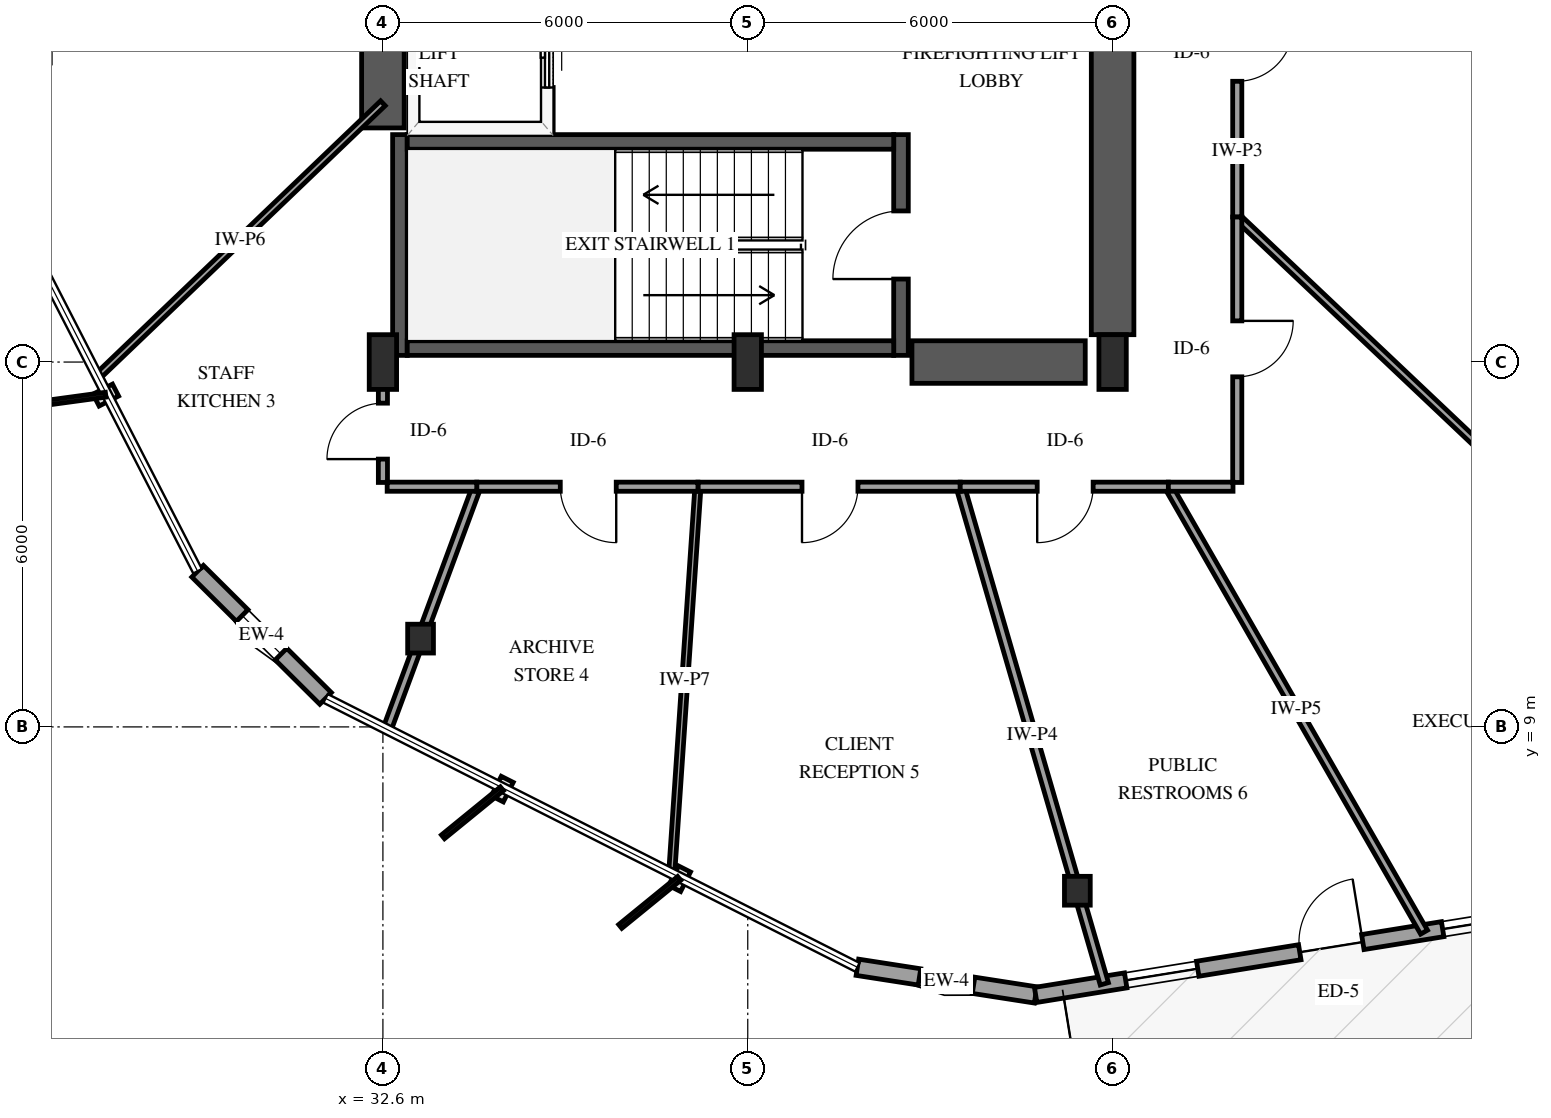
"""IFC4 building model, lengths in metres.
Left out: names, types, materials, properties, quantities, classifications, styles, units other than length and angle.
Written with IfcOpenShell. Run it as: python <this file> out.ifc"""

import sys

from ifc_helpers import new_model, si_unit, direction, frame, frame_2d, origin, origin_2d, place, context, subcontext, project, spatial, rectangle, i_section, extrude, element, fill, save


model = new_model("IFC4")
c1 = context("Model", 3, precision=1e-05, world=origin(), true_north=direction((0.0, 1.0)))
c2 = subcontext(c1, "Body", "Model", "MODEL_VIEW")
j1 = project(units=[si_unit("LENGTHUNIT", "METRE"), si_unit("PLANEANGLEUNIT", "RADIAN")], contexts=[c1])
p1 = place(None, origin())
s1 = spatial("IfcSite", under=j1, at=p1, CompositionType="ELEMENT")
p2 = place(p1, origin())
s2 = spatial("IfcBuilding", under=s1, at=p2, CompositionType="ELEMENT")
p3 = place(p2, frame((0.0, 0.0, 62.6)))
s3 = spatial("IfcBuildingStorey", under=s2, at=p3, CompositionType="ELEMENT", Elevation=62.6)
p4 = place(p3, frame((32.88, 15.11, 0.0), z_axis=(0.0, 0.0, 1.0), x_axis=(0.0, 1.0, 0.0)))
e1 = element("IfcWall", 1, at=p4, inside=s3, PredefinedType="SHEAR", context=c2, shape_type="SweptSolid", body=[
    extrude(rectangle(XDim=3.63, YDim=0.24, at=frame_2d((1.815, 0.0))), origin(), (0.0, 0.0, 1.0), 4.0),
])
p5 = place(p3, frame((41.12, 15.11, 0.0), z_axis=(0.0, 0.0, 1.0), x_axis=(0.0, 1.0, 0.0)))
e2 = element("IfcWall", 2, at=p5, inside=s3, PredefinedType="SHEAR", context=c2, shape_type="SweptSolid", body=[
    extrude(rectangle(XDim=3.63, YDim=0.24, at=frame_2d((1.815, 0.0))), origin(), (0.0, 0.0, 1.0), 4.0),
])
p6 = place(p5, frame((1.255, 0.0, 0.0)))
e3 = element("IfcOpeningElement", 3, at=p6, cuts=e2, PredefinedType="OPENING", context=c2, shape_type="SweptSolid", body=[
    extrude(rectangle(XDim=1.12, YDim=2.15, at=frame_2d((0.56, 1.075))), frame((0.0, 0.13, 0.0), z_axis=(0.0, -1.0, 0.0), x_axis=(1.0, 0.0, 0.0)), (0.0, 0.0, 1.0), 0.26),
])
for number, where, z_axis, x_axis in (
    (4, (33.0, 15.23, 0.0), (0.0, 0.0, 1.0), (1.0, 0.0, 0.0)),
    (5, (33.0, 18.62, 0.0), (0.0, 0.0, 1.0), (1.0, 0.0, 0.0)),
):
    element("IfcWall", number, at=place(p3, frame(where, z_axis=z_axis, x_axis=x_axis)), inside=s3, PredefinedType="SHEAR", context=c2, shape_type="SweptSolid", body=[
        extrude(rectangle(XDim=8.0, YDim=0.24, at=frame_2d((4.0, 0.0))), origin(), (0.0, 0.0, 1.0), 4.0),
    ])
p7 = place(p3, frame((32.6, 18.85, 0.0), z_axis=(0.0, 0.0, 1.0), x_axis=(0.0, 1.0, 0.0)))
e6 = element("IfcWall", 6, at=p7, inside=s3, PredefinedType="SHEAR", context=c2, shape_type="SweptSolid", body=[
    extrude(rectangle(XDim=12.3, YDim=0.7, at=frame_2d((6.15, 0.0))), origin(), (0.0, 0.0, 1.0), 4.0),
])
p8 = place(p3, frame((41.3, 15.0, 0.0), z_axis=(0.0, 0.0, 1.0), x_axis=(1.0, 0.0, 0.0)))
e7 = element("IfcWall", 7, at=p8, inside=s3, PredefinedType="SHEAR", context=c2, shape_type="SweptSolid", body=[
    extrude(rectangle(XDim=2.85, YDim=0.7, at=frame_2d((1.425, 0.0))), origin(), (0.0, 0.0, 1.0), 4.0),
])
p9 = place(p3, frame((44.6, 15.45, 0.0), z_axis=(0.0, 0.0, 1.0), x_axis=(0.0, 1.0, 0.0)))
e8 = element("IfcWall", 8, at=p9, inside=s3, PredefinedType="SHEAR", context=c2, shape_type="SweptSolid", body=[
    extrude(rectangle(XDim=6.35, YDim=0.7, at=frame_2d((3.175, 0.0))), origin(), (0.0, 0.0, 1.0), 4.0),
])
for number, where, z_axis, x_axis in (
    (9, (32.6, 15.0, 0.0), (0.0, 0.0, 1.0), (1.0, 0.0, 0.0)),
    (10, (38.6, 15.0, 0.0), (0.0, 0.0, 1.0), (1.0, 0.0, 0.0)),
    (11, (44.6, 15.0, 0.0), (0.0, 0.0, 1.0), (1.0, 0.0, 0.0)),
):
    element("IfcColumn", number, at=place(p3, frame(where, z_axis=z_axis, x_axis=x_axis)), inside=s3, PredefinedType="PILASTER", context=c2, shape_type="SweptSolid", body=[
        extrude(rectangle(XDim=0.45, YDim=0.9, at=origin_2d()), origin(), (0.0, 0.0, 1.0), 4.0),
    ])
for number, where, z_axis, x_axis in (
    (12, (33.219, 10.452, 0.0), (0.0, 0.0, 1.0), (1.0, 0.0, 0.0)),
    (13, (44.02, 6.306, 0.0), (0.0, 0.0, 1.0), (1.0, 0.0, 0.0)),
):
    element("IfcColumn", number, at=place(p3, frame(where, z_axis=z_axis, x_axis=x_axis)), inside=s3, PredefinedType="COLUMN", context=c2, shape_type="SweptSolid", body=[
        extrude(i_section(OverallWidth=0.424, OverallDepth=0.474, WebThickness=0.048, FlangeThickness=0.077, FilletRadius=0.038, at=origin_2d()), origin(), (0.0, 0.0, 1.0), 4.0),
    ])
p10 = place(p3, frame((29.553, 11.56, 0.0), z_axis=(0.0, 0.0, 1.0), x_axis=(0.709325332319, -0.704881247396, 0.0)))
e14 = element("IfcWall", 14, at=p10, inside=s3, PredefinedType="SOLIDWALL", context=c2, shape_type="SweptSolid", body=[
    extrude(rectangle(XDim=2.967, YDim=0.27, at=frame_2d((1.483, 0.0))), origin(), (0.0, 0.0, 1.0), 3.079),
])
p11 = place(p10, frame((1.033, 0.0, 0.75)))
e15 = element("IfcOpeningElement", 15, at=p11, cuts=e14, PredefinedType="OPENING", context=c2, shape_type="SweptSolid", body=[
    extrude(rectangle(XDim=0.9, YDim=1.5, at=frame_2d((0.45, 0.75))), frame((0.0, 0.145, 0.0), z_axis=(0.0, -1.0, 0.0), x_axis=(1.0, 0.0, 0.0)), (0.0, 0.0, 1.0), 0.29),
])
p12 = place(p3, frame((40.403, 5.047, 0.0), z_axis=(0.0, 0.0, 1.0), x_axis=(0.988175838345, -0.153324859402, 0.0)))
e16 = element("IfcWall", 16, at=p12, inside=s3, PredefinedType="SOLIDWALL", context=c2, shape_type="SweptSolid", body=[
    extrude(rectangle(XDim=2.967, YDim=0.27, at=frame_2d((1.483, 0.0))), origin(), (0.0, 0.0, 1.0), 3.079),
])
p13 = place(p12, frame((1.033, 0.0, 0.75)))
e17 = element("IfcOpeningElement", 17, at=p13, cuts=e16, PredefinedType="OPENING", context=c2, shape_type="SweptSolid", body=[
    extrude(rectangle(XDim=0.9, YDim=1.5, at=frame_2d((0.45, 0.75))), frame((0.0, 0.145, 0.0), z_axis=(0.0, -1.0, 0.0), x_axis=(1.0, 0.0, 0.0)), (0.0, 0.0, 1.0), 0.29),
])
p14 = place(p3, frame((43.334, 4.592, 0.0), z_axis=(0.0, 0.0, 1.0), x_axis=(0.987191297579, 0.159541035424, 0.0)))
e18 = element("IfcWall", 18, at=p14, inside=s3, PredefinedType="SOLIDWALL", context=c2, shape_type="SweptSolid", body=[
    extrude(rectangle(XDim=9.8, YDim=0.25, at=frame_2d((4.9, 0.0))), origin(), (0.0, 0.0, 1.0), 3.079),
])
p15 = place(p14, frame((4.4, 0.0, 0.0)))
e19 = element("IfcOpeningElement", 19, at=p15, cuts=e18, PredefinedType="OPENING", context=c2, shape_type="SweptSolid", body=[
    extrude(rectangle(XDim=1.05, YDim=2.15, at=frame_2d((0.525, 1.075))), frame((0.0, 0.135, 0.0), z_axis=(0.0, -1.0, 0.0), x_axis=(1.0, 0.0, 0.0)), (0.0, 0.0, 1.0), 0.27),
])
p16 = place(p14, frame((1.5, 0.0, 0.72)))
e20 = element("IfcOpeningElement", 20, at=p16, cuts=e18, PredefinedType="OPENING", context=c2, shape_type="SweptSolid", body=[
    extrude(rectangle(XDim=1.2, YDim=1.6, at=frame_2d((0.6, 0.8))), frame((0.0, 0.135, 0.0), z_axis=(0.0, -1.0, 0.0), x_axis=(1.0, 0.0, 0.0)), (0.0, 0.0, 1.0), 0.27),
])
p17 = place(p14, frame((6.78, 0.0, 0.72)))
e21 = element("IfcOpeningElement", 21, at=p17, cuts=e18, PredefinedType="OPENING", context=c2, shape_type="SweptSolid", body=[
    extrude(rectangle(XDim=1.2, YDim=1.6, at=frame_2d((0.6, 0.8))), frame((0.0, 0.135, 0.0), z_axis=(0.0, -1.0, 0.0), x_axis=(1.0, 0.0, 0.0)), (0.0, 0.0, 1.0), 0.27),
])
p18 = place(p3, frame((35.3, 18.79, 0.0), z_axis=(0.0, 0.0, 1.0), x_axis=(0.0, 1.0, 0.0)))
e22 = element("IfcWall", 22, at=p18, inside=s3, PredefinedType="SOLIDWALL", context=c2, shape_type="SweptSolid", body=[
    extrude(rectangle(XDim=2.55, YDim=0.2, at=frame_2d((1.275, 0.0))), origin(), (0.0, 0.0, 1.0), 3.7),
])
p19 = place(p18, frame((0.725, 0.0, 0.0)))
e23 = element("IfcOpeningElement", 23, at=p19, cuts=e22, PredefinedType="OPENING", context=c2, shape_type="SweptSolid", body=[
    extrude(rectangle(XDim=1.1, YDim=2.15, at=frame_2d((0.55, 1.075))), frame((0.0, 0.11, 0.0), z_axis=(0.0, -1.0, 0.0), x_axis=(1.0, 0.0, 0.0)), (0.0, 0.0, 1.0), 0.22),
])
p20 = place(p3, frame((46.65, 22.738, 0.0), z_axis=(0.0, 0.0, 1.0), x_axis=(0.96273546892, -0.270444849983, 0.0)))
e24 = element("IfcWall", 24, at=p20, inside=s3, PredefinedType="PARTITIONING", context=c2, shape_type="SweptSolid", body=[
    extrude(rectangle(XDim=18.033, YDim=0.14, at=frame_2d((9.017, 0.0))), origin(), (0.0, 0.0, 1.0), 2.995),
])
p21 = place(p3, frame((46.65, 17.385, 0.0), z_axis=(0.0, 0.0, 1.0), x_axis=(0.726390421285, -0.68728229707, 0.0)))
e25 = element("IfcWall", 25, at=p21, inside=s3, PredefinedType="PARTITIONING", context=c2, shape_type="SweptSolid", body=[
    extrude(rectangle(XDim=13.347, YDim=0.12, at=frame_2d((6.673, 0.0))), origin(), (0.0, 0.0, 1.0), 2.995),
])
p22 = place(p3, frame((42.094, 12.95, 0.0), z_axis=(0.0, 0.0, 1.0), x_axis=(0.278454336149, -0.960449469092, 0.0)))
e26 = element("IfcWall", 26, at=p22, inside=s3, PredefinedType="PARTITIONING", context=c2, shape_type="SweptSolid", body=[
    extrude(rectangle(XDim=8.512, YDim=0.14, at=frame_2d((4.256, 0.0))), origin(), (0.0, 0.0, 1.0), 2.995),
])
p23 = place(p3, frame((45.517, 12.95, 0.0), z_axis=(0.0, 0.0, 1.0), x_axis=(0.497846985281, -0.867264884131, 0.0)))
e27 = element("IfcWall", 27, at=p23, inside=s3, PredefinedType="PARTITIONING", context=c2, shape_type="SweptSolid", body=[
    extrude(rectangle(XDim=8.446, YDim=0.13, at=frame_2d((4.223, 0.0))), origin(), (0.0, 0.0, 1.0), 3.074),
])
p24 = place(p3, frame((32.6, 19.255, 0.0), z_axis=(0.0, 0.0, 1.0), x_axis=(-0.722348754287, -0.691528941679, 0.0)))
e28 = element("IfcWall", 28, at=p24, inside=s3, PredefinedType="PARTITIONING", context=c2, shape_type="SweptSolid", body=[
    extrude(rectangle(XDim=6.496, YDim=0.11, at=frame_2d((3.248, 0.0))), origin(), (0.0, 0.0, 1.0), 3.7),
])
p25 = place(p3, frame((37.781, 12.95, 0.0), z_axis=(0.0, 0.0, 1.0), x_axis=(-0.067762188279, -0.997701501372, 0.0)))
e29 = element("IfcWall", 29, at=p25, inside=s3, PredefinedType="PARTITIONING", context=c2, shape_type="SweptSolid", body=[
    extrude(rectangle(XDim=6.374, YDim=0.1, at=frame_2d((3.187, 0.0))), origin(), (0.0, 0.0, 1.0), 3.7),
])
p26 = place(p3, frame((46.65, 22.738, 0.0), z_axis=(0.0, 0.0, 1.0), x_axis=(0.0, -1.0, 0.0)))
e30 = element("IfcWall", 30, at=p26, inside=s3, PredefinedType="PARTITIONING", context=c2, shape_type="SweptSolid", body=[
    extrude(rectangle(XDim=5.353, YDim=0.15, at=frame_2d((2.677, 0.0))), origin(), (0.0, 0.0, 1.0), 3.7),
])
p27 = place(p26, frame((2.201, 0.0, 0.0)))
e31 = element("IfcOpeningElement", 31, at=p27, cuts=e30, PredefinedType="OPENING", context=c2, shape_type="SweptSolid", body=[
    extrude(rectangle(XDim=0.92, YDim=2.12, at=frame_2d((0.46, 1.06))), frame((0.0, 0.085, 0.0), z_axis=(0.0, -1.0, 0.0), x_axis=(1.0, 0.0, 0.0)), (0.0, 0.0, 1.0), 0.17),
])
p28 = place(p3, frame((46.65, 17.385, 0.0), z_axis=(0.0, 0.0, 1.0), x_axis=(0.0, -1.0, 0.0)))
e32 = element("IfcWall", 32, at=p28, inside=s3, PredefinedType="PARTITIONING", context=c2, shape_type="SweptSolid", body=[
    extrude(rectangle(XDim=4.365, YDim=0.15, at=frame_2d((2.183, 0.0))), origin(), (0.0, 0.0, 1.0), 3.7),
])
p29 = place(p28, frame((1.708, 0.0, 0.0)))
e33 = element("IfcOpeningElement", 33, at=p29, cuts=e32, PredefinedType="OPENING", context=c2, shape_type="SweptSolid", body=[
    extrude(rectangle(XDim=0.92, YDim=2.12, at=frame_2d((0.46, 1.06))), frame((0.0, 0.085, 0.0), z_axis=(0.0, -1.0, 0.0), x_axis=(1.0, 0.0, 0.0)), (0.0, 0.0, 1.0), 0.17),
])
p30 = place(p3, frame((42.094, 12.95, 0.0), z_axis=(0.0, 0.0, 1.0), x_axis=(-1.0, 0.0, 0.0)))
e34 = element("IfcWall", 34, at=p30, inside=s3, PredefinedType="PARTITIONING", context=c2, shape_type="SweptSolid", body=[
    extrude(rectangle(XDim=4.313, YDim=0.15, at=frame_2d((2.156, 0.0))), origin(), (0.0, 0.0, 1.0), 3.7),
])
p31 = place(p30, frame((1.682, 0.0, 0.0)))
e35 = element("IfcOpeningElement", 35, at=p31, cuts=e34, PredefinedType="OPENING", context=c2, shape_type="SweptSolid", body=[
    extrude(rectangle(XDim=0.92, YDim=2.12, at=frame_2d((0.46, 1.06))), frame((0.0, 0.085, 0.0), z_axis=(0.0, -1.0, 0.0), x_axis=(1.0, 0.0, 0.0)), (0.0, 0.0, 1.0), 0.17),
])
p32 = place(p3, frame((34.143, 12.95, 0.0), z_axis=(0.0, 0.0, 1.0), x_axis=(-0.34681361274, -0.937934069121, 0.0)))
e36 = element("IfcWall", 36, at=p32, inside=s3, PredefinedType="PARTITIONING", context=c2, shape_type="SweptSolid", body=[
    extrude(rectangle(XDim=4.256, YDim=0.14, at=frame_2d((2.128, 0.0))), origin(), (0.0, 0.0, 1.0), 2.995),
])
p33 = place(p3, frame((37.781, 12.95, 0.0), z_axis=(0.0, 0.0, 1.0), x_axis=(-1.0, 0.0, 0.0)))
e37 = element("IfcWall", 37, at=p33, inside=s3, PredefinedType="PARTITIONING", context=c2, shape_type="SweptSolid", body=[
    extrude(rectangle(XDim=3.638, YDim=0.15, at=frame_2d((1.819, 0.0))), origin(), (0.0, 0.0, 1.0), 3.7),
])
p34 = place(p33, frame((1.344, 0.0, 0.0)))
e38 = element("IfcOpeningElement", 38, at=p34, cuts=e37, PredefinedType="OPENING", context=c2, shape_type="SweptSolid", body=[
    extrude(rectangle(XDim=0.92, YDim=2.12, at=frame_2d((0.46, 1.06))), frame((0.0, 0.085, 0.0), z_axis=(0.0, -1.0, 0.0), x_axis=(1.0, 0.0, 0.0)), (0.0, 0.0, 1.0), 0.17),
])
p35 = place(p3, frame((45.517, 12.95, 0.0), z_axis=(0.0, 0.0, 1.0), x_axis=(-1.0, 0.0, 0.0)))
e39 = element("IfcWall", 39, at=p35, inside=s3, PredefinedType="PARTITIONING", context=c2, shape_type="SweptSolid", body=[
    extrude(rectangle(XDim=3.423, YDim=0.15, at=frame_2d((1.711, 0.0))), origin(), (0.0, 0.0, 1.0), 3.7),
])
p36 = place(p35, frame((1.237, 0.0, 0.0)))
e40 = element("IfcOpeningElement", 40, at=p36, cuts=e39, PredefinedType="OPENING", context=c2, shape_type="SweptSolid", body=[
    extrude(rectangle(XDim=0.92, YDim=2.12, at=frame_2d((0.46, 1.06))), frame((0.0, 0.085, 0.0), z_axis=(0.0, -1.0, 0.0), x_axis=(1.0, 0.0, 0.0)), (0.0, 0.0, 1.0), 0.17),
])
p37 = place(p3, frame((32.6, 13.02, 0.0), z_axis=(0.0, 0.0, 1.0), x_axis=(0.0, 1.0, 0.0)))
e41 = element("IfcWall", 41, at=p37, inside=s3, PredefinedType="PARTITIONING", context=c2, shape_type="SweptSolid", body=[
    extrude(rectangle(XDim=1.91, YDim=0.15, at=frame_2d((0.955, 0.0))), origin(), (0.0, 0.0, 1.0), 3.7),
])
p38 = place(p37, frame((0.384, 0.0, 0.0)))
e42 = element("IfcOpeningElement", 42, at=p38, cuts=e41, PredefinedType="OPENING", context=c2, shape_type="SweptSolid", body=[
    extrude(rectangle(XDim=0.92, YDim=2.12, at=frame_2d((0.46, 1.06))), frame((0.0, 0.085, 0.0), z_axis=(0.0, -1.0, 0.0), x_axis=(1.0, 0.0, 0.0)), (0.0, 0.0, 1.0), 0.17),
])
p39 = place(p3, frame((34.143, 12.95, 0.0), z_axis=(0.0, 0.0, 1.0), x_axis=(-1.0, 0.0, 0.0)))
e43 = element("IfcWall", 43, at=p39, inside=s3, PredefinedType="PARTITIONING", context=c2, shape_type="SweptSolid", body=[
    extrude(rectangle(XDim=1.473, YDim=0.15, at=frame_2d((0.737, 0.0))), origin(), (0.0, 0.0, 1.0), 3.7),
])
p40 = place(p3, frame((46.58, 12.95, 0.0), z_axis=(0.0, 0.0, 1.0), x_axis=(-1.0, 0.0, 0.0)))
e44 = element("IfcWall", 44, at=p40, inside=s3, PredefinedType="PARTITIONING", context=c2, shape_type="SweptSolid", body=[
    extrude(rectangle(XDim=1.063, YDim=0.15, at=frame_2d((0.531, 0.0))), origin(), (0.0, 0.0, 1.0), 3.7),
])
p41 = place(p11, origin())
e45 = element("IfcWindow", 45, at=p41, inside=s3, PartitioningType="SINGLE_PANEL", PredefinedType="WINDOW", context=c2, shape_type="SweptSolid", body=[
    extrude(rectangle(XDim=0.9, YDim=1.5, at=frame_2d((0.45, 0.75))), frame((0.0, 0.03, 0.0), z_axis=(0.0, -1.0, 0.0), x_axis=(1.0, 0.0, 0.0)), (0.0, 0.0, 1.0), 0.06),
])
fill(e15, e45)
p42 = place(p13, origin())
e46 = element("IfcWindow", 46, at=p42, inside=s3, PartitioningType="SINGLE_PANEL", PredefinedType="WINDOW", context=c2, shape_type="SweptSolid", body=[
    extrude(rectangle(XDim=0.9, YDim=1.5, at=frame_2d((0.45, 0.75))), frame((0.0, 0.03, 0.0), z_axis=(0.0, -1.0, 0.0), x_axis=(1.0, 0.0, 0.0)), (0.0, 0.0, 1.0), 0.06),
])
fill(e17, e46)
p43 = place(p15, origin())
e47 = element("IfcDoor", 47, at=p43, inside=s3, OperationType="SINGLE_SWING_RIGHT", PredefinedType="DOOR", context=c2, shape_type="SweptSolid", body=[
    extrude(rectangle(XDim=1.05, YDim=2.15, at=frame_2d((0.525, 1.075))), frame((0.0, 0.025, 0.0), z_axis=(0.0, -1.0, 0.0), x_axis=(1.0, 0.0, 0.0)), (0.0, 0.0, 1.0), 0.05),
])
fill(e19, e47)
p44 = place(p16, origin())
e48 = element("IfcWindow", 48, at=p44, inside=s3, PartitioningType="SINGLE_PANEL", PredefinedType="WINDOW", context=c2, shape_type="SweptSolid", body=[
    extrude(rectangle(XDim=1.2, YDim=1.6, at=frame_2d((0.6, 0.8))), frame((0.0, 0.03, 0.0), z_axis=(0.0, -1.0, 0.0), x_axis=(1.0, 0.0, 0.0)), (0.0, 0.0, 1.0), 0.06),
])
fill(e20, e48)
p45 = place(p17, origin())
e49 = element("IfcWindow", 49, at=p45, inside=s3, PartitioningType="SINGLE_PANEL", PredefinedType="WINDOW", context=c2, shape_type="SweptSolid", body=[
    extrude(rectangle(XDim=1.2, YDim=1.6, at=frame_2d((0.6, 0.8))), frame((0.0, 0.03, 0.0), z_axis=(0.0, -1.0, 0.0), x_axis=(1.0, 0.0, 0.0)), (0.0, 0.0, 1.0), 0.06),
])
fill(e21, e49)
p46 = place(p19, origin())
e50 = element("IfcDoor", 50, at=p46, inside=s3, OperationType="SLIDING_TO_LEFT", PredefinedType="DOOR", context=c2, shape_type="SweptSolid", body=[
    extrude(rectangle(XDim=1.1, YDim=2.15, at=frame_2d((0.55, 1.075))), frame((0.0, 0.025, 0.0), z_axis=(0.0, -1.0, 0.0), x_axis=(1.0, 0.0, 0.0)), (0.0, 0.0, 1.0), 0.05),
])
fill(e23, e50)
p47 = place(p6, origin())
e51 = element("IfcDoor", 51, at=p47, inside=s3, OperationType="SINGLE_SWING_LEFT", PredefinedType="DOOR", context=c2, shape_type="SweptSolid", body=[
    extrude(rectangle(XDim=1.12, YDim=2.15, at=frame_2d((0.56, 1.075))), frame((0.0, 0.025, 0.0), z_axis=(0.0, -1.0, 0.0), x_axis=(1.0, 0.0, 0.0)), (0.0, 0.0, 1.0), 0.05),
])
fill(e3, e51)
p48 = place(p27, origin())
e52 = element("IfcDoor", 52, at=p48, inside=s3, OperationType="SINGLE_SWING_LEFT", PredefinedType="DOOR", context=c2, shape_type="SweptSolid", body=[
    extrude(rectangle(XDim=0.92, YDim=2.12, at=frame_2d((0.46, 1.06))), frame((0.0, 0.025, 0.0), z_axis=(0.0, -1.0, 0.0), x_axis=(1.0, 0.0, 0.0)), (0.0, 0.0, 1.0), 0.05),
])
fill(e31, e52)
p49 = place(p29, origin())
e53 = element("IfcDoor", 53, at=p49, inside=s3, OperationType="SINGLE_SWING_LEFT", PredefinedType="DOOR", context=c2, shape_type="SweptSolid", body=[
    extrude(rectangle(XDim=0.92, YDim=2.12, at=frame_2d((0.46, 1.06))), frame((0.0, 0.025, 0.0), z_axis=(0.0, -1.0, 0.0), x_axis=(1.0, 0.0, 0.0)), (0.0, 0.0, 1.0), 0.05),
])
fill(e33, e53)
p50 = place(p31, origin())
e54 = element("IfcDoor", 54, at=p50, inside=s3, OperationType="SINGLE_SWING_RIGHT", PredefinedType="DOOR", context=c2, shape_type="SweptSolid", body=[
    extrude(rectangle(XDim=0.92, YDim=2.12, at=frame_2d((0.46, 1.06))), frame((0.0, 0.025, 0.0), z_axis=(0.0, -1.0, 0.0), x_axis=(1.0, 0.0, 0.0)), (0.0, 0.0, 1.0), 0.05),
])
fill(e35, e54)
p51 = place(p34, origin())
e55 = element("IfcDoor", 55, at=p51, inside=s3, OperationType="SINGLE_SWING_LEFT", PredefinedType="DOOR", context=c2, shape_type="SweptSolid", body=[
    extrude(rectangle(XDim=0.92, YDim=2.12, at=frame_2d((0.46, 1.06))), frame((0.0, 0.025, 0.0), z_axis=(0.0, -1.0, 0.0), x_axis=(1.0, 0.0, 0.0)), (0.0, 0.0, 1.0), 0.05),
])
fill(e38, e55)
p52 = place(p36, origin())
e56 = element("IfcDoor", 56, at=p52, inside=s3, OperationType="SINGLE_SWING_RIGHT", PredefinedType="DOOR", context=c2, shape_type="SweptSolid", body=[
    extrude(rectangle(XDim=0.92, YDim=2.12, at=frame_2d((0.46, 1.06))), frame((0.0, 0.025, 0.0), z_axis=(0.0, -1.0, 0.0), x_axis=(1.0, 0.0, 0.0)), (0.0, 0.0, 1.0), 0.05),
])
fill(e40, e56)
p53 = place(p38, origin())
e57 = element("IfcDoor", 57, at=p53, inside=s3, OperationType="SINGLE_SWING_LEFT", PredefinedType="DOOR", context=c2, shape_type="SweptSolid", body=[
    extrude(rectangle(XDim=0.92, YDim=2.12, at=frame_2d((0.46, 1.06))), frame((0.0, 0.025, 0.0), z_axis=(0.0, -1.0, 0.0), x_axis=(1.0, 0.0, 0.0)), (0.0, 0.0, 1.0), 0.05),
])
fill(e42, e57)
save(model, sys.argv[1])
